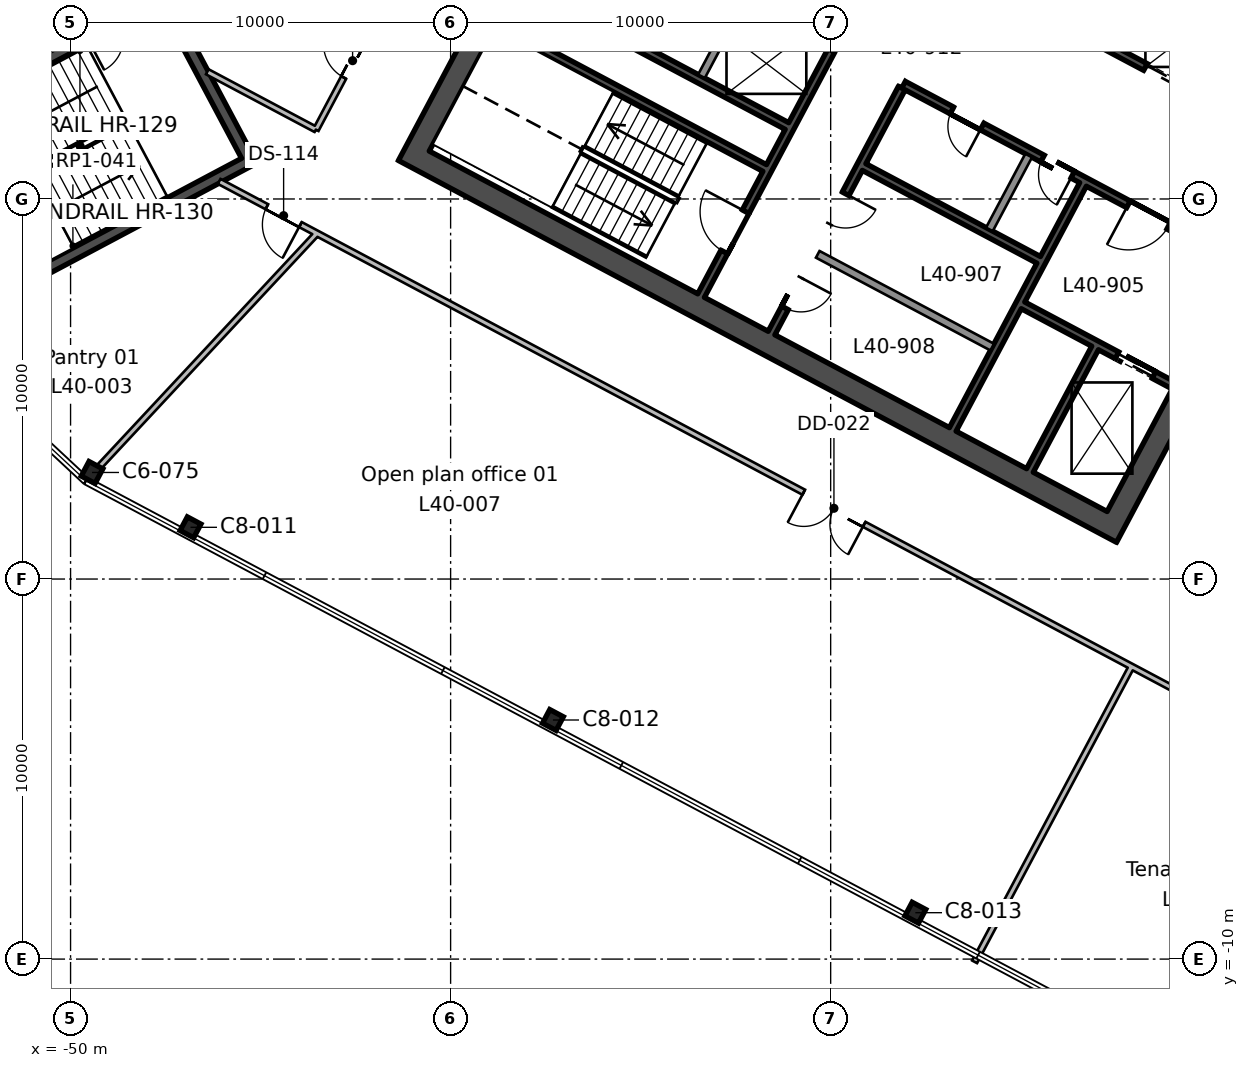
"""IFC4 building model, lengths in metres.
Left out: names, types, materials, properties, quantities, classifications, styles, units other than length and angle.
Written with IfcOpenShell. Run it as: python <this file> out.ifc"""

import sys

from ifc_helpers import new_model, si_unit, direction, frame, frame_2d, origin, origin_2d, place, context, subcontext, project, spatial, rectangle, i_section, extrude, element, fill, save


model = new_model("IFC4")
c1 = context("Model", 3, precision=1e-05, world=origin(), true_north=direction((0.0, 1.0)))
c2 = subcontext(c1, "Body", "Model", "MODEL_VIEW")
j1 = project(units=[si_unit("LENGTHUNIT", "METRE"), si_unit("PLANEANGLEUNIT", "RADIAN")], contexts=[c1])
p1 = place(None, origin())
s1 = spatial("IfcSite", under=j1, at=p1, CompositionType="ELEMENT")
p2 = place(p1, origin())
s2 = spatial("IfcBuilding", under=s1, at=p2, CompositionType="ELEMENT")
p3 = place(p2, frame((0.0, 0.0, 189.6)))
s3 = spatial("IfcBuildingStorey", under=s2, at=p3, CompositionType="ELEMENT", Elevation=189.6)
for number, where, z_axis, x_axis in (
    (1, (-27.772, -8.779, 0.0), (0.0, 0.0, 1.0), (0.883, -0.469, 0.0)),
    (2, (-37.308, -3.709, 0.0), (0.0, 0.0, 1.0), (0.883, -0.469, 0.0)),
    (3, (-46.844, 1.361, 0.0), (0.0, 0.0, 1.0), (0.883, -0.469, 0.0)),
):
    element("IfcColumn", number, at=place(p3, frame(where, z_axis=z_axis, x_axis=x_axis)), inside=s3, PredefinedType="COLUMN", context=c2, shape_type="SweptSolid", body=[
        extrude(i_section(OverallWidth=0.404, OverallDepth=0.406, WebThickness=0.027, FlangeThickness=0.044, FilletRadius=0.015, at=origin_2d()), origin(), (0.0, 0.0, 1.0), 3.9),
    ])
p4 = place(p3, frame((-49.435, 2.804, 0.0), z_axis=(0.0, 0.0, 1.0), x_axis=(0.882947592859, -0.469471562786, 0.0)))
e4 = element("IfcColumn", 4, at=p4, inside=s3, PredefinedType="COLUMN", context=c2, shape_type="SweptSolid", body=[
    extrude(i_section(OverallWidth=0.412, OverallDepth=0.434, WebThickness=0.036, FlangeThickness=0.057, FilletRadius=0.015, at=origin_2d()), origin(), (0.0, 0.0, 1.0), 3.9),
])
p5 = place(p3, frame((-13.635, 18.236, 0.0), z_axis=(0.0, 0.0, 1.0), x_axis=(-0.469478769487, -0.88294376095, 0.0)))
e5 = element("IfcWall", 5, at=p5, inside=s3, PredefinedType="SHEAR", context=c2, shape_type="SweptSolid", body=[
    extrude(rectangle(XDim=19.4, YDim=0.6, at=frame_2d((9.7, 0.0))), origin(), (0.0, 0.0, 1.0), 3.9),
])
p6 = place(p5, frame((6.7, 0.0, 0.0)))
e6 = element("IfcOpeningElement", 6, at=p6, cuts=e5, PredefinedType="OPENING", context=c2, shape_type="SweptSolid", body=[
    extrude(rectangle(XDim=2.4, YDim=2.4, at=frame_2d((1.2, 1.2))), frame((0.0, 0.31, 0.0), z_axis=(0.0, -1.0, 0.0), x_axis=(1.0, 0.0, 0.0)), (0.0, 0.0, 1.0), 0.62),
])
p7 = place(p3, frame((-32.0, 28.001, 0.0), z_axis=(0.0, 0.0, 1.0), x_axis=(-0.469468958625, -0.882948977511, 0.0)))
e7 = element("IfcWall", 7, at=p7, inside=s3, PredefinedType="SHEAR", context=c2, shape_type="SweptSolid", body=[
    extrude(rectangle(XDim=19.4, YDim=0.6, at=frame_2d((9.7, 0.0))), origin(), (0.0, 0.0, 1.0), 3.9),
])
p8 = place(p7, frame((10.3, 0.0, 0.0)))
e8 = element("IfcOpeningElement", 8, at=p8, cuts=e7, PredefinedType="OPENING", context=c2, shape_type="SweptSolid", body=[
    extrude(rectangle(XDim=2.4, YDim=2.4, at=frame_2d((1.2, 1.2))), frame((0.0, 0.31, 0.0), z_axis=(0.0, -1.0, 0.0), x_axis=(1.0, 0.0, 0.0)), (0.0, 0.0, 1.0), 0.62),
])
p9 = place(p3, frame((-22.867, 1.512, 0.0), z_axis=(0.0, 0.0, 1.0), x_axis=(-0.88294509198, 0.469476266226, 0.0)))
e9 = element("IfcWall", 9, at=p9, inside=s3, PredefinedType="SHEAR", context=c2, shape_type="SweptSolid", body=[
    extrude(rectangle(XDim=20.2, YDim=0.6, at=frame_2d((10.1, 0.0))), origin(), (0.0, 0.0, 1.0), 3.9),
])
p10 = place(p3, frame((-23.043, 6.08, 0.0), z_axis=(0.0, 0.0, 1.0), x_axis=(-0.469494272526, -0.882935517501, 0.0)))
e10 = element("IfcWall", 10, at=p10, inside=s3, PredefinedType="SHEAR", context=c2, shape_type="SweptSolid", body=[
    extrude(rectangle(XDim=3.65, YDim=0.2, at=frame_2d((1.825, 0.0))), origin(), (0.0, 0.0, 1.0), 3.9),
])
p11 = place(p3, frame((-23.36, 10.382, 0.0), z_axis=(0.0, 0.0, 1.0), x_axis=(-0.469480409012, -0.88294288918, 0.0)))
e11 = element("IfcWall", 11, at=p11, inside=s3, PredefinedType="SHEAR", context=c2, shape_type="SweptSolid", body=[
    extrude(rectangle(XDim=7.3, YDim=0.2, at=frame_2d((3.65, 0.0))), origin(), (0.0, 0.0, 1.0), 3.9),
])
p12 = place(p3, frame((-24.791, 11.143, 0.0), z_axis=(0.0, 0.0, 1.0), x_axis=(-0.469487830541, -0.882938942948, 0.0)))
e12 = element("IfcWall", 12, at=p12, inside=s3, PredefinedType="SOLIDWALL", context=c2, shape_type="SweptSolid", body=[
    extrude(rectangle(XDim=2.2, YDim=0.2, at=frame_2d((1.1, 0.0))), origin(), (0.0, 0.0, 1.0), 3.9),
])
p13 = place(p3, frame((-28.128, 12.917, 0.0), z_axis=(0.0, 0.0, 1.0), x_axis=(-0.469454336211, -0.882956752176, 0.0)))
e13 = element("IfcWall", 13, at=p13, inside=s3, PredefinedType="SHEAR", context=c2, shape_type="SweptSolid", body=[
    extrude(rectangle(XDim=7.3, YDim=0.2, at=frame_2d((3.65, 0.0))), origin(), (0.0, 0.0, 1.0), 3.9),
])
p14 = place(p13, frame((3.15, 0.0, 0.0)))
e14 = element("IfcOpeningElement", 14, at=p14, cuts=e13, PredefinedType="OPENING", context=c2, shape_type="SweptSolid", body=[
    extrude(rectangle(XDim=0.9, YDim=2.1, at=frame_2d((0.45, 1.05))), frame((0.0, 0.11, 0.0), z_axis=(0.0, -1.0, 0.0), x_axis=(1.0, 0.0, 0.0)), (0.0, 0.0, 1.0), 0.22),
])
p15 = place(p13, frame((5.65, 0.0, 0.0)))
e15 = element("IfcOpeningElement", 15, at=p15, cuts=e13, PredefinedType="OPENING", context=c2, shape_type="SweptSolid", body=[
    extrude(rectangle(XDim=0.9, YDim=2.1, at=frame_2d((0.45, 1.05))), frame((0.0, 0.11, 0.0), z_axis=(0.0, -1.0, 0.0), x_axis=(1.0, 0.0, 0.0)), (0.0, 0.0, 1.0), 0.22),
])
p16 = place(p3, frame((-29.982, 13.903, 0.0), z_axis=(0.0, 0.0, 1.0), x_axis=(-0.469454336211, -0.882956752176, 0.0)))
e16 = element("IfcWall", 16, at=p16, inside=s3, PredefinedType="SHEAR", context=c2, shape_type="SweptSolid", body=[
    extrude(rectangle(XDim=7.3, YDim=0.2, at=frame_2d((3.65, 0.0))), origin(), (0.0, 0.0, 1.0), 3.9),
])
p17 = place(p16, frame((4.8, 0.0, 0.0)))
e17 = element("IfcOpeningElement", 17, at=p17, cuts=e16, PredefinedType="OPENING", context=c2, shape_type="SweptSolid", body=[
    extrude(rectangle(XDim=1.2, YDim=2.1, at=frame_2d((0.6, 1.05))), frame((0.0, 0.11, 0.0), z_axis=(0.0, -1.0, 0.0), x_axis=(1.0, 0.0, 0.0)), (0.0, 0.0, 1.0), 0.22),
])
p18 = place(p3, frame((-32.366, 15.171, 0.0), z_axis=(0.0, 0.0, 1.0), x_axis=(-0.469487830541, -0.882938942948, 0.0)))
e18 = element("IfcWall", 18, at=p18, inside=s3, PredefinedType="SOLIDWALL", context=c2, shape_type="SweptSolid", body=[
    extrude(rectangle(XDim=2.2, YDim=0.2, at=frame_2d((1.1, 0.0))), origin(), (0.0, 0.0, 1.0), 3.9),
])
p19 = place(p3, frame((-16.529, 13.432, 0.0), z_axis=(0.0, 0.0, 1.0), x_axis=(-0.88295287151, 0.469461634952, 0.0)))
e19 = element("IfcWall", 19, at=p19, inside=s3, PredefinedType="SHEAR", context=c2, shape_type="SweptSolid", body=[
    extrude(rectangle(XDim=8.0, YDim=0.2, at=frame_2d((4.0, 0.0))), origin(), (0.0, 0.0, 1.0), 3.9),
])
p20 = place(p3, frame((-20.04, 12.581, 0.0), z_axis=(0.0, 0.0, 1.0), x_axis=(-0.882942972946, 0.469480251476, 0.0)))
e20 = element("IfcWall", 20, at=p20, inside=s3, PredefinedType="SHEAR", context=c2, shape_type="SweptSolid", body=[
    extrude(rectangle(XDim=5.4, YDim=0.2, at=frame_2d((2.7, 0.0))), origin(), (0.0, 0.0, 1.0), 3.9),
])
p21 = place(p20, frame((0.8, 0.0, 0.0)))
e21 = element("IfcOpeningElement", 21, at=p21, cuts=e20, PredefinedType="OPENING", context=c2, shape_type="SweptSolid", body=[
    extrude(rectangle(XDim=1.1, YDim=2.1, at=frame_2d((0.55, 1.05))), frame((0.0, 0.11, 0.0), z_axis=(0.0, -1.0, 0.0), x_axis=(1.0, 0.0, 0.0)), (0.0, 0.0, 1.0), 0.22),
])
p22 = place(p20, frame((3.5, 0.0, 0.0)))
e22 = element("IfcOpeningElement", 22, at=p22, cuts=e20, PredefinedType="OPENING", context=c2, shape_type="SweptSolid", body=[
    extrude(rectangle(XDim=1.1, YDim=2.1, at=frame_2d((0.55, 1.05))), frame((0.0, 0.11, 0.0), z_axis=(0.0, -1.0, 0.0), x_axis=(1.0, 0.0, 0.0)), (0.0, 0.0, 1.0), 0.22),
])
p23 = place(p3, frame((-19.252, 8.311, 0.0), z_axis=(0.0, 0.0, 1.0), x_axis=(-0.882955722218, 0.469456273365, 0.0)))
e23 = element("IfcWall", 23, at=p23, inside=s3, PredefinedType="SHEAR", context=c2, shape_type="SweptSolid", body=[
    extrude(rectangle(XDim=10.0, YDim=0.2, at=frame_2d((5.0, 0.0))), origin(), (0.0, 0.0, 1.0), 3.9),
])
p24 = place(p23, frame((2.1, 0.0, 0.0)))
e24 = element("IfcOpeningElement", 24, at=p24, cuts=e23, PredefinedType="OPENING", context=c2, shape_type="SweptSolid", body=[
    extrude(rectangle(XDim=1.2, YDim=2.1, at=frame_2d((0.6, 1.05))), frame((0.0, 0.11, 0.0), z_axis=(0.0, -1.0, 0.0), x_axis=(1.0, 0.0, 0.0)), (0.0, 0.0, 1.0), 0.22),
])
p25 = place(p23, frame((4.96, 0.0, 0.0)))
e25 = element("IfcOpeningElement", 25, at=p25, cuts=e23, PredefinedType="OPENING", context=c2, shape_type="SweptSolid", body=[
    extrude(rectangle(XDim=0.9, YDim=2.1, at=frame_2d((0.45, 1.05))), frame((0.0, 0.11, 0.0), z_axis=(0.0, -1.0, 0.0), x_axis=(1.0, 0.0, 0.0)), (0.0, 0.0, 1.0), 0.22),
])
p26 = place(p23, frame((7.66, 0.0, 0.0)))
e26 = element("IfcOpeningElement", 26, at=p26, cuts=e23, PredefinedType="OPENING", context=c2, shape_type="SweptSolid", body=[
    extrude(rectangle(XDim=0.9, YDim=2.1, at=frame_2d((0.45, 1.05))), frame((0.0, 0.11, 0.0), z_axis=(0.0, -1.0, 0.0), x_axis=(1.0, 0.0, 0.0)), (0.0, 0.0, 1.0), 0.22),
])
p27 = place(p3, frame((-24.528, 8.398, 0.0), z_axis=(0.0, 0.0, 1.0), x_axis=(-0.882953967957, 0.469459572775, 0.0)))
e27 = element("IfcWall", 27, at=p27, inside=s3, PredefinedType="SHEAR", context=c2, shape_type="SweptSolid", body=[
    extrude(rectangle(XDim=5.2, YDim=0.2, at=frame_2d((2.6, 0.0))), origin(), (0.0, 0.0, 1.0), 3.9),
])
p28 = place(p3, frame((-31.15, 11.919, 0.0), z_axis=(0.0, 0.0, 1.0), x_axis=(-0.882940221191, 0.469485426614, 0.0)))
e28 = element("IfcWall", 28, at=p28, inside=s3, PredefinedType="SHEAR", context=c2, shape_type="SweptSolid", body=[
    extrude(rectangle(XDim=8.0, YDim=0.2, at=frame_2d((4.0, 0.0))), origin(), (0.0, 0.0, 1.0), 3.9),
])
p29 = place(p3, frame((-20.965, 5.088, 0.0), z_axis=(0.0, 0.0, 1.0), x_axis=(-0.882925986334, 0.469512196493, 0.0)))
e29 = element("IfcWall", 29, at=p29, inside=s3, PredefinedType="SHEAR", context=c2, shape_type="SweptSolid", body=[
    extrude(rectangle(XDim=4.5, YDim=0.2, at=frame_2d((2.25, 0.0))), origin(), (0.0, 0.0, 1.0), 3.9),
])
p30 = place(p29, frame((0.6, 0.0, 0.0)))
e30 = element("IfcOpeningElement", 30, at=p30, cuts=e29, PredefinedType="OPENING", context=c2, shape_type="SweptSolid", body=[
    extrude(rectangle(XDim=1.1, YDim=2.1, at=frame_2d((0.55, 1.05))), frame((0.0, 0.11, 0.0), z_axis=(0.0, -1.0, 0.0), x_axis=(1.0, 0.0, 0.0)), (0.0, 0.0, 1.0), 0.22),
])
p31 = place(p3, frame((-31.737, 10.816, 0.0), z_axis=(0.0, 0.0, 1.0), x_axis=(-0.882940221191, 0.469485426614, 0.0)))
e31 = element("IfcWall", 31, at=p31, inside=s3, PredefinedType="SHEAR", context=c2, shape_type="SweptSolid", body=[
    extrude(rectangle(XDim=8.0, YDim=0.2, at=frame_2d((4.0, 0.0))), origin(), (0.0, 0.0, 1.0), 3.9),
])
p32 = place(p3, frame((-25.749, 6.103, 0.0), z_axis=(0.0, 0.0, 1.0), x_axis=(-0.882953967957, 0.469459572775, 0.0)))
e32 = element("IfcWall", 32, at=p32, inside=s3, PredefinedType="SOLIDWALL", context=c2, shape_type="SweptSolid", body=[
    extrude(rectangle(XDim=5.2, YDim=0.2, at=frame_2d((2.6, 0.0))), origin(), (0.0, 0.0, 1.0), 3.9),
])
p33 = place(p3, frame((-47.574, 15.29, 0.0), z_axis=(0.0, 0.0, 1.0), x_axis=(0.469443498566, -0.882962514297, 0.0)))
e33 = element("IfcWall", 33, at=p33, inside=s3, PredefinedType="SHEAR", context=c2, shape_type="SweptSolid", body=[
    extrude(rectangle(XDim=4.85, YDim=0.3, at=frame_2d((2.425, 0.0))), origin(), (0.0, 0.0, 1.0), 3.9),
])
p34 = place(p3, frame((-45.297, 11.007, 0.0), z_axis=(0.0, 0.0, 1.0), x_axis=(-0.882951519127, -0.469464178475, 0.0)))
e34 = element("IfcWall", 34, at=p34, inside=s3, PredefinedType="SHEAR", context=c2, shape_type="SweptSolid", body=[
    extrude(rectangle(XDim=8.3, YDim=0.3, at=frame_2d((4.15, 0.0))), origin(), (0.0, 0.0, 1.0), 3.9),
])
p35 = place(p3, frame((-54.903, 11.393, 0.0), z_axis=(0.0, 0.0, 1.0), x_axis=(0.882939326045, 0.469487110071, 0.0)))
e35 = element("IfcWall", 35, at=p35, inside=s3, PredefinedType="SHEAR", context=c2, shape_type="SweptSolid", body=[
    extrude(rectangle(XDim=8.3, YDim=0.3, at=frame_2d((4.15, 0.0))), origin(), (0.0, 0.0, 1.0), 3.9),
])
p36 = place(p35, frame((6.05, 0.0, 0.0)))
e36 = element("IfcOpeningElement", 36, at=p36, cuts=e35, PredefinedType="OPENING", context=c2, shape_type="SweptSolid", body=[
    extrude(rectangle(XDim=1.9, YDim=2.1, at=frame_2d((0.95, 1.05))), frame((0.0, 0.16, 0.0), z_axis=(0.0, -1.0, 0.0), x_axis=(1.0, 0.0, 0.0)), (0.0, 0.0, 1.0), 0.32),
])
p37 = place(p3, frame((-43.519, 9.096, 0.0), z_axis=(0.0, 0.0, 1.0), x_axis=(-0.681976527411, -0.731374060287, 0.0)))
e37 = element("IfcWall", 37, at=p37, inside=s3, PredefinedType="PARTITIONING", context=c2, shape_type="SweptSolid", body=[
    extrude(rectangle(XDim=8.402, YDim=0.15, at=frame_2d((4.201, 0.0))), origin(), (0.0, 0.0, 1.0), 3.54),
])
p38 = place(p3, frame((-22.083, -2.302, 0.0), z_axis=(0.0, 0.0, 1.0), x_axis=(-0.469445946219, -0.882961212952, 0.0)))
e38 = element("IfcWall", 38, at=p38, inside=s3, PredefinedType="PARTITIONING", context=c2, shape_type="SweptSolid", body=[
    extrude(rectangle(XDim=8.8, YDim=0.15, at=frame_2d((4.4, 0.0))), origin(), (0.0, 0.0, 1.0), 3.54),
])
p39 = place(p3, frame((-46.403, 13.347, 0.0), z_axis=(0.0, 0.0, 1.0), x_axis=(0.882974130461, -0.469421649411, 0.0)))
e39 = element("IfcWall", 39, at=p39, inside=s3, PredefinedType="PARTITIONING", context=c2, shape_type="SweptSolid", body=[
    extrude(rectangle(XDim=3.238, YDim=0.15, at=frame_2d((1.619, 0.0))), origin(), (0.0, 0.0, 1.0), 3.54),
])
p40 = place(p3, frame((-41.618, 15.45, 0.0), z_axis=(0.0, 0.0, 1.0), x_axis=(-0.468819008191, -0.883294253099, 0.0)))
e40 = element("IfcWall", 40, at=p40, inside=s3, PredefinedType="PARTITIONING", context=c2, shape_type="SweptSolid", body=[
    extrude(rectangle(XDim=4.106, YDim=0.15, at=frame_2d((2.053, 0.0))), origin(), (0.0, 0.0, 1.0), 3.54),
])
p41 = place(p40, frame((1.55, 0.0, 0.0)))
e41 = element("IfcOpeningElement", 41, at=p41, cuts=e40, PredefinedType="OPENING", context=c2, shape_type="SweptSolid", body=[
    extrude(rectangle(XDim=1.0, YDim=2.1, at=frame_2d((0.5, 1.05))), frame((0.0, 0.085, 0.0), z_axis=(0.0, -1.0, 0.0), x_axis=(1.0, 0.0, 0.0)), (0.0, 0.0, 1.0), 0.17),
])
p42 = place(p3, frame((-13.8, -6.706, 0.0), z_axis=(0.0, 0.0, 1.0), x_axis=(-0.882947286887, 0.469472138235, 0.0)))
e42 = element("IfcWall", 42, at=p42, inside=s3, PredefinedType="PARTITIONING", context=c2, shape_type="SweptSolid", body=[
    extrude(rectangle(XDim=36.571, YDim=0.15, at=frame_2d((18.285, 0.0))), origin(), (0.0, 0.0, 1.0), 3.54),
])
p43 = place(p42, frame((34.15, 0.0, 0.0)))
e43 = element("IfcOpeningElement", 43, at=p43, cuts=e42, PredefinedType="OPENING", context=c2, shape_type="SweptSolid", body=[
    extrude(rectangle(XDim=1.0, YDim=2.1, at=frame_2d((0.5, 1.05))), frame((0.0, 0.085, 0.0), z_axis=(0.0, -1.0, 0.0), x_axis=(1.0, 0.0, 0.0)), (0.0, 0.0, 1.0), 0.17),
])
p44 = place(p42, frame((17.35, 0.0, 0.0)))
e44 = element("IfcOpeningElement", 44, at=p44, cuts=e42, PredefinedType="OPENING", context=c2, shape_type="SweptSolid", body=[
    extrude(rectangle(XDim=1.8, YDim=2.1, at=frame_2d((0.9, 1.05))), frame((0.0, 0.085, 0.0), z_axis=(0.0, -1.0, 0.0), x_axis=(1.0, 0.0, 0.0)), (0.0, 0.0, 1.0), 0.17),
])
p45 = place(p24, origin())
e45 = element("IfcDoor", 45, at=p45, inside=s3, OperationType="SINGLE_SWING_RIGHT", PredefinedType="DOOR", context=c2, shape_type="SweptSolid", body=[
    extrude(rectangle(XDim=1.2, YDim=2.1, at=frame_2d((0.6, 1.05))), frame((0.0, 0.025, 0.0), z_axis=(0.0, -1.0, 0.0), x_axis=(1.0, 0.0, 0.0)), (0.0, 0.0, 1.0), 0.05),
])
fill(e24, e45)
p46 = place(p17, frame((1.2, 0.0, 0.0), z_axis=(0.0, 0.0, 1.0), x_axis=(-1.0, 0.0, 0.0)))
e46 = element("IfcDoor", 46, at=p46, inside=s3, OperationType="SINGLE_SWING_RIGHT", PredefinedType="DOOR", context=c2, shape_type="SweptSolid", body=[
    extrude(rectangle(XDim=1.2, YDim=2.1, at=frame_2d((0.6, 1.05))), frame((0.0, 0.025, 0.0), z_axis=(0.0, -1.0, 0.0), x_axis=(1.0, 0.0, 0.0)), (0.0, 0.0, 1.0), 0.05),
])
fill(e17, e46)
p47 = place(p25, origin())
e47 = element("IfcDoor", 47, at=p47, inside=s3, OperationType="SINGLE_SWING_LEFT", PredefinedType="DOOR", context=c2, shape_type="SweptSolid", body=[
    extrude(rectangle(XDim=0.9, YDim=2.1, at=frame_2d((0.45, 1.05))), frame((0.0, 0.025, 0.0), z_axis=(0.0, -1.0, 0.0), x_axis=(1.0, 0.0, 0.0)), (0.0, 0.0, 1.0), 0.05),
])
fill(e25, e47)
p48 = place(p26, origin())
e48 = element("IfcDoor", 48, at=p48, inside=s3, OperationType="SINGLE_SWING_LEFT", PredefinedType="DOOR", context=c2, shape_type="SweptSolid", body=[
    extrude(rectangle(XDim=0.9, YDim=2.1, at=frame_2d((0.45, 1.05))), frame((0.0, 0.025, 0.0), z_axis=(0.0, -1.0, 0.0), x_axis=(1.0, 0.0, 0.0)), (0.0, 0.0, 1.0), 0.05),
])
fill(e26, e48)
p49 = place(p21, origin())
e49 = element("IfcDoor", 49, at=p49, inside=s3, OperationType="DOUBLE_DOOR_SLIDING", PredefinedType="DOOR", context=c2, shape_type="SweptSolid", body=[
    extrude(rectangle(XDim=1.1, YDim=2.1, at=frame_2d((0.55, 1.05))), frame((0.0, 0.025, 0.0), z_axis=(0.0, -1.0, 0.0), x_axis=(1.0, 0.0, 0.0)), (0.0, 0.0, 1.0), 0.05),
])
fill(e21, e49)
p50 = place(p30, origin())
e50 = element("IfcDoor", 50, at=p50, inside=s3, OperationType="DOUBLE_DOOR_SLIDING", PredefinedType="DOOR", context=c2, shape_type="SweptSolid", body=[
    extrude(rectangle(XDim=1.1, YDim=2.1, at=frame_2d((0.55, 1.05))), frame((0.0, 0.025, 0.0), z_axis=(0.0, -1.0, 0.0), x_axis=(1.0, 0.0, 0.0)), (0.0, 0.0, 1.0), 0.05),
])
fill(e30, e50)
p51 = place(p14, origin())
e51 = element("IfcDoor", 51, at=p51, inside=s3, OperationType="SINGLE_SWING_LEFT", PredefinedType="DOOR", context=c2, shape_type="SweptSolid", body=[
    extrude(rectangle(XDim=0.9, YDim=2.1, at=frame_2d((0.45, 1.05))), frame((0.0, 0.025, 0.0), z_axis=(0.0, -1.0, 0.0), x_axis=(1.0, 0.0, 0.0)), (0.0, 0.0, 1.0), 0.05),
])
fill(e14, e51)
p52 = place(p15, origin())
e52 = element("IfcDoor", 52, at=p52, inside=s3, OperationType="SINGLE_SWING_LEFT", PredefinedType="DOOR", context=c2, shape_type="SweptSolid", body=[
    extrude(rectangle(XDim=0.9, YDim=2.1, at=frame_2d((0.45, 1.05))), frame((0.0, 0.025, 0.0), z_axis=(0.0, -1.0, 0.0), x_axis=(1.0, 0.0, 0.0)), (0.0, 0.0, 1.0), 0.05),
])
fill(e15, e52)
p53 = place(p41, frame((1.0, 0.0, 0.0), z_axis=(0.0, 0.0, 1.0), x_axis=(-1.0, 0.0, 0.0)))
e53 = element("IfcDoor", 53, at=p53, inside=s3, OperationType="SINGLE_SWING_RIGHT", PredefinedType="DOOR", context=c2, shape_type="SweptSolid", body=[
    extrude(rectangle(XDim=1.0, YDim=2.1, at=frame_2d((0.5, 1.05))), frame((0.0, 0.025, 0.0), z_axis=(0.0, -1.0, 0.0), x_axis=(1.0, 0.0, 0.0)), (0.0, 0.0, 1.0), 0.05),
])
fill(e41, e53)
p54 = place(p43, origin())
e54 = element("IfcDoor", 54, at=p54, inside=s3, OperationType="SINGLE_SWING_LEFT", PredefinedType="DOOR", context=c2, shape_type="SweptSolid", body=[
    extrude(rectangle(XDim=1.0, YDim=2.1, at=frame_2d((0.5, 1.05))), frame((0.0, 0.025, 0.0), z_axis=(0.0, -1.0, 0.0), x_axis=(1.0, 0.0, 0.0)), (0.0, 0.0, 1.0), 0.05),
])
fill(e43, e54)
p55 = place(p44, origin())
e55 = element("IfcDoor", 55, at=p55, inside=s3, OperationType="DOUBLE_DOOR_SINGLE_SWING", PredefinedType="DOOR", context=c2, shape_type="SweptSolid", body=[
    extrude(rectangle(XDim=1.8, YDim=2.1, at=frame_2d((0.9, 1.05))), frame((0.0, 0.025, 0.0), z_axis=(0.0, -1.0, 0.0), x_axis=(1.0, 0.0, 0.0)), (0.0, 0.0, 1.0), 0.05),
])
fill(e44, e55)
save(model, sys.argv[1])
